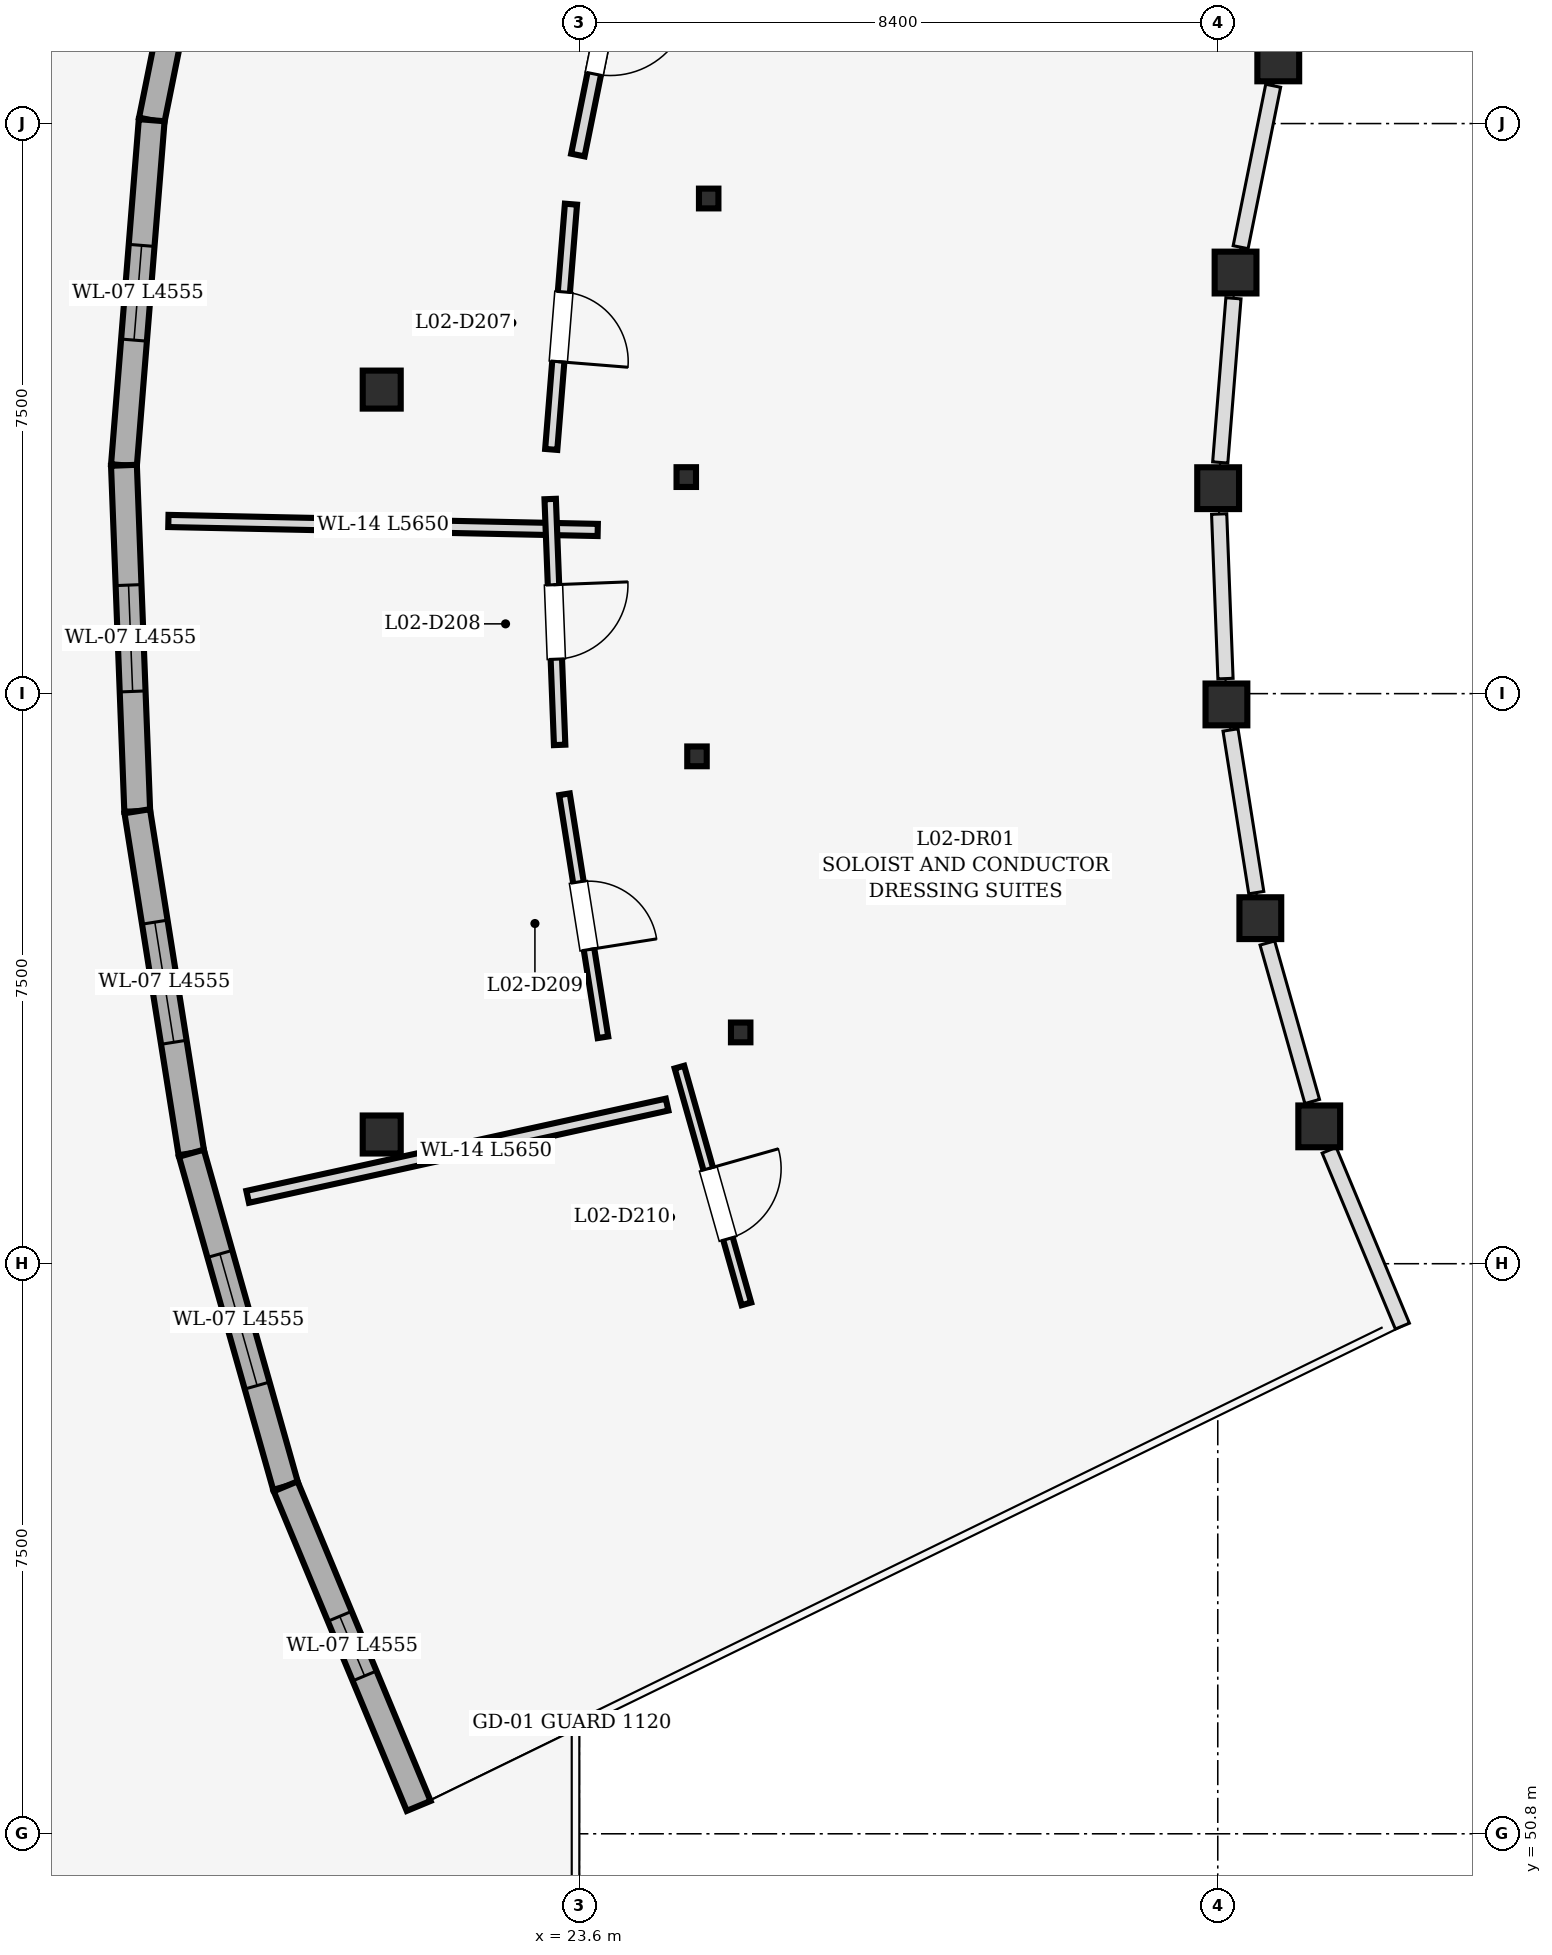
"""IFC4 building model, lengths in metres.
Left out: names, types, materials, properties, quantities, classifications, styles, units other than length and angle.
Written with IfcOpenShell. Run it as: python <this file> out.ifc"""

import sys

from ifc_helpers import new_model, si_unit, direction, frame, frame_2d, origin, origin_2d, place, context, subcontext, project, spatial, rectangle, i_section, extrude, element, fill, save


model = new_model("IFC4")
c1 = context("Model", 3, precision=1e-05, world=origin(), true_north=direction((0.0, 1.0)))
c2 = subcontext(c1, "Body", "Model", "MODEL_VIEW")
j1 = project(units=[si_unit("LENGTHUNIT", "METRE"), si_unit("PLANEANGLEUNIT", "RADIAN")], contexts=[c1])
p1 = place(None, origin())
s1 = spatial("IfcSite", under=j1, at=p1, CompositionType="ELEMENT")
p2 = place(p1, origin())
s2 = spatial("IfcBuilding", under=s1, at=p2, CompositionType="ELEMENT")
p3 = place(p2, frame((0.0, 0.0, 5.4)))
s3 = spatial("IfcBuildingStorey", under=s2, at=p3, CompositionType="ELEMENT", Elevation=5.4)
for number, where, z_axis, x_axis in (
    (1, (32.796, 74.131, 0.0), (0.0, 0.0, 1.0), (1.0, 0.0, 0.0)),
    (2, (32.234, 71.34, 0.0), (0.0, 0.0, 1.0), (1.0, 0.0, 0.0)),
):
    element("IfcColumn", number, at=place(p3, frame(where, z_axis=z_axis, x_axis=x_axis)), inside=s3, PredefinedType="COLUMN", context=c2, shape_type="SweptSolid", body=[
        extrude(rectangle(XDim=0.55, YDim=0.55, at=origin_2d()), origin(), (0.0, 0.0, 1.0), 4.8),
    ])
p4 = place(p3, frame((25.302, 72.314, 0.0), z_axis=(0.0, 0.0, 1.0), x_axis=(1.0, 0.0, 0.0)))
e3 = element("IfcColumn", 3, at=p4, inside=s3, PredefinedType="COLUMN", context=c2, shape_type="SweptSolid", body=[
    extrude(i_section(OverallWidth=0.256, OverallDepth=0.26, WebThickness=0.01, FlangeThickness=0.017, at=origin_2d()), origin(), (0.0, 0.0, 1.0), 4.8),
])
p5 = place(p3, frame((32.005, 68.503, 0.0), z_axis=(0.0, 0.0, 1.0), x_axis=(1.0, 0.0, 0.0)))
e4 = element("IfcColumn", 4, at=p5, inside=s3, PredefinedType="COLUMN", context=c2, shape_type="SweptSolid", body=[
    extrude(rectangle(XDim=0.55, YDim=0.55, at=origin_2d()), origin(), (0.0, 0.0, 1.0), 4.8),
])
p6 = place(p3, frame((25.007, 68.649, 0.0), z_axis=(0.0, 0.0, 1.0), x_axis=(1.0, 0.0, 0.0)))
e5 = element("IfcColumn", 5, at=p6, inside=s3, PredefinedType="COLUMN", context=c2, shape_type="SweptSolid", body=[
    extrude(i_section(OverallWidth=0.256, OverallDepth=0.26, WebThickness=0.01, FlangeThickness=0.017, at=origin_2d()), origin(), (0.0, 0.0, 1.0), 4.8),
])
p7 = place(p3, frame((32.114, 65.658, 0.0), z_axis=(0.0, 0.0, 1.0), x_axis=(1.0, 0.0, 0.0)))
e6 = element("IfcColumn", 6, at=p7, inside=s3, PredefinedType="COLUMN", context=c2, shape_type="SweptSolid", body=[
    extrude(rectangle(XDim=0.55, YDim=0.55, at=origin_2d()), origin(), (0.0, 0.0, 1.0), 4.8),
])
p8 = place(p3, frame((25.148, 64.975, 0.0), z_axis=(0.0, 0.0, 1.0), x_axis=(1.0, 0.0, 0.0)))
e7 = element("IfcColumn", 7, at=p8, inside=s3, PredefinedType="COLUMN", context=c2, shape_type="SweptSolid", body=[
    extrude(i_section(OverallWidth=0.256, OverallDepth=0.26, WebThickness=0.01, FlangeThickness=0.017, at=origin_2d()), origin(), (0.0, 0.0, 1.0), 4.8),
])
p9 = place(p3, frame((32.56, 62.846, 0.0), z_axis=(0.0, 0.0, 1.0), x_axis=(1.0, 0.0, 0.0)))
e8 = element("IfcColumn", 8, at=p9, inside=s3, PredefinedType="COLUMN", context=c2, shape_type="SweptSolid", body=[
    extrude(rectangle(XDim=0.55, YDim=0.55, at=origin_2d()), origin(), (0.0, 0.0, 1.0), 4.8),
])
p10 = place(p3, frame((25.723, 61.343, 0.0), z_axis=(0.0, 0.0, 1.0), x_axis=(1.0, 0.0, 0.0)))
e9 = element("IfcColumn", 9, at=p10, inside=s3, PredefinedType="COLUMN", context=c2, shape_type="SweptSolid", body=[
    extrude(i_section(OverallWidth=0.256, OverallDepth=0.26, WebThickness=0.01, FlangeThickness=0.017, at=origin_2d()), origin(), (0.0, 0.0, 1.0), 4.8),
])
p11 = place(p3, frame((33.335, 60.107, 0.0), z_axis=(0.0, 0.0, 1.0), x_axis=(1.0, 0.0, 0.0)))
e10 = element("IfcColumn", 10, at=p11, inside=s3, PredefinedType="COLUMN", context=c2, shape_type="SweptSolid", body=[
    extrude(rectangle(XDim=0.55, YDim=0.55, at=origin_2d()), origin(), (0.0, 0.0, 1.0), 4.8),
])
for number, where, z_axis, x_axis in (
    (11, (21.0, 60.0, 0.0), (0.0, 0.0, 1.0), (1.0, 0.0, 0.0)),
    (12, (21.0, 69.8, 0.0), (0.0, 0.0, 1.0), (1.0, 0.0, 0.0)),
):
    element("IfcColumn", number, at=place(p3, frame(where, z_axis=z_axis, x_axis=x_axis)), inside=s3, PredefinedType="COLUMN", context=c2, shape_type="SweptSolid", body=[
        extrude(rectangle(XDim=0.5, YDim=0.5, at=origin_2d()), origin(), (0.0, 0.0, 1.0), 4.8),
    ])
p12 = place(p3, frame((18.874, 77.809, 0.0), z_axis=(0.0, 0.0, 1.0), x_axis=(-0.197682700785, -0.980266060726, 0.0)))
e13 = element("IfcWall", 13, at=p12, inside=s3, PredefinedType="STANDARD", context=c2, shape_type="SweptSolid", body=[
    extrude(rectangle(XDim=4.555, YDim=0.34, at=frame_2d((2.277, 0.0))), origin(), (0.0, 0.0, 1.0), 4.505),
])
p13 = place(p12, frame((1.702, 0.0, 0.85)))
e14 = element("IfcOpeningElement", 14, at=p13, cuts=e13, PredefinedType="OPENING", context=c2, shape_type="SweptSolid", body=[
    extrude(rectangle(XDim=1.15, YDim=2.2, at=frame_2d((0.575, 1.1))), frame((0.0, 0.182, 0.0), z_axis=(0.0, -1.0, 0.0), x_axis=(1.0, 0.0, 0.0)), (0.0, 0.0, 1.0), 0.364),
])
p14 = place(p3, frame((17.974, 73.344, 0.0), z_axis=(0.0, 0.0, 1.0), x_axis=(-0.080188345633, -0.996779729541, 0.0)))
e15 = element("IfcWall", 15, at=p14, inside=s3, PredefinedType="STANDARD", context=c2, shape_type="SweptSolid", body=[
    extrude(rectangle(XDim=4.555, YDim=0.34, at=frame_2d((2.277, 0.0))), origin(), (0.0, 0.0, 1.0), 4.505),
])
p15 = place(p14, frame((1.652, 0.0, 0.85)))
e16 = element("IfcOpeningElement", 16, at=p15, cuts=e15, PredefinedType="OPENING", context=c2, shape_type="SweptSolid", body=[
    extrude(rectangle(XDim=1.25, YDim=2.2, at=frame_2d((0.625, 1.1))), frame((0.0, 0.182, 0.0), z_axis=(0.0, -1.0, 0.0), x_axis=(1.0, 0.0, 0.0)), (0.0, 0.0, 1.0), 0.364),
])
p16 = place(p3, frame((17.608, 68.804, 0.0), z_axis=(0.0, 0.0, 1.0), x_axis=(0.038377542804, -0.999263310749, 0.0)))
e17 = element("IfcWall", 17, at=p16, inside=s3, PredefinedType="STANDARD", context=c2, shape_type="SweptSolid", body=[
    extrude(rectangle(XDim=4.555, YDim=0.34, at=frame_2d((2.277, 0.0))), origin(), (0.0, 0.0, 1.0), 4.505),
])
p17 = place(p16, frame((1.577, 0.0, 0.85)))
e18 = element("IfcOpeningElement", 18, at=p17, cuts=e17, PredefinedType="OPENING", context=c2, shape_type="SweptSolid", body=[
    extrude(rectangle(XDim=1.4, YDim=2.2, at=frame_2d((0.7, 1.1))), frame((0.0, 0.182, 0.0), z_axis=(0.0, -1.0, 0.0), x_axis=(1.0, 0.0, 0.0)), (0.0, 0.0, 1.0), 0.364),
])
p18 = place(p3, frame((17.783, 64.253, 0.0), z_axis=(0.0, 0.0, 1.0), x_axis=(0.156466273676, -0.987683302077, 0.0)))
e19 = element("IfcWall", 19, at=p18, inside=s3, PredefinedType="STANDARD", context=c2, shape_type="SweptSolid", body=[
    extrude(rectangle(XDim=4.555, YDim=0.34, at=frame_2d((2.277, 0.0))), origin(), (0.0, 0.0, 1.0), 4.505),
])
p19 = place(p18, frame((1.477, 0.0, 0.85)))
e20 = element("IfcOpeningElement", 20, at=p19, cuts=e19, PredefinedType="OPENING", context=c2, shape_type="SweptSolid", body=[
    extrude(rectangle(XDim=1.6, YDim=2.2, at=frame_2d((0.8, 1.1))), frame((0.0, 0.182, 0.0), z_axis=(0.0, -1.0, 0.0), x_axis=(1.0, 0.0, 0.0)), (0.0, 0.0, 1.0), 0.364),
])
p20 = place(p3, frame((18.496, 59.754, 0.0), z_axis=(0.0, 0.0, 1.0), x_axis=(0.272249427892, -0.962226713936, 0.0)))
e21 = element("IfcWall", 21, at=p20, inside=s3, PredefinedType="STANDARD", context=c2, shape_type="SweptSolid", body=[
    extrude(rectangle(XDim=4.555, YDim=0.34, at=frame_2d((2.277, 0.0))), origin(), (0.0, 0.0, 1.0), 4.505),
])
p21 = place(p20, frame((1.377, 0.0, 0.85)))
e22 = element("IfcOpeningElement", 22, at=p21, cuts=e21, PredefinedType="OPENING", context=c2, shape_type="SweptSolid", body=[
    extrude(rectangle(XDim=1.8, YDim=2.2, at=frame_2d((0.9, 1.1))), frame((0.0, 0.182, 0.0), z_axis=(0.0, -1.0, 0.0), x_axis=(1.0, 0.0, 0.0)), (0.0, 0.0, 1.0), 0.364),
])
p22 = place(p3, frame((19.736, 55.372, 0.0), z_axis=(0.0, 0.0, 1.0), x_axis=(0.384310891198, -0.923203736402, 0.0)))
e23 = element("IfcWall", 23, at=p22, inside=s3, PredefinedType="STANDARD", context=c2, shape_type="SweptSolid", body=[
    extrude(rectangle(XDim=4.555, YDim=0.34, at=frame_2d((2.277, 0.0))), origin(), (0.0, 0.0, 1.0), 3.807),
])
p23 = place(p22, frame((1.852, 0.0, 0.85)))
e24 = element("IfcOpeningElement", 24, at=p23, cuts=e23, PredefinedType="OPENING", context=c2, shape_type="SweptSolid", body=[
    extrude(rectangle(XDim=0.85, YDim=1.95, at=frame_2d((0.425, 0.975))), frame((0.0, 0.182, 0.0), z_axis=(0.0, -1.0, 0.0), x_axis=(1.0, 0.0, 0.0)), (0.0, 0.0, 1.0), 0.364),
])
p24 = place(p3, frame((23.842, 67.953, 0.0), z_axis=(0.0, 0.0, 1.0), x_axis=(-0.999780386636, 0.020956586028, 0.0)))
e25 = element("IfcWall", 25, at=p24, inside=s3, PredefinedType="PARTITIONING", context=c2, shape_type="SweptSolid", body=[
    extrude(rectangle(XDim=5.65, YDim=0.16, at=frame_2d((2.825, 0.0))), origin(), (0.0, 0.0, 1.0), 4.505),
])
p25 = place(p3, frame((24.755, 60.393, 0.0), z_axis=(0.0, 0.0, 1.0), x_axis=(-0.976668579504, -0.214752149721, 0.0)))
e26 = element("IfcWall", 26, at=p25, inside=s3, PredefinedType="PARTITIONING", context=c2, shape_type="SweptSolid", body=[
    extrude(rectangle(XDim=5.65, YDim=0.16, at=frame_2d((2.825, 0.0))), origin(), (0.0, 0.0, 1.0), 3.807),
])
p26 = place(p3, frame((24.22, 76.059, 0.0), z_axis=(0.0, 0.0, 1.0), x_axis=(-0.197609875313, -0.980280744062, 0.0)))
e27 = element("IfcWall", 27, at=p26, inside=s3, PredefinedType="PARTITIONING", context=c2, shape_type="SweptSolid", body=[
    extrude(rectangle(XDim=3.237, YDim=0.18, at=frame_2d((1.618, 0.0))), origin(), (0.0, 0.0, 1.0), 4.505),
])
p27 = place(p26, frame((1.088, 0.0, 0.0)))
e28 = element("IfcOpeningElement", 28, at=p27, cuts=e27, PredefinedType="OPENING", context=c2, shape_type="SweptSolid", body=[
    extrude(rectangle(XDim=1.06, YDim=2.24, at=frame_2d((0.53, 1.12))), frame((0.0, 0.102, 0.0), z_axis=(0.0, -1.0, 0.0), x_axis=(1.0, 0.0, 0.0)), (0.0, 0.0, 1.0), 0.204),
])
p28 = place(p3, frame((23.49, 72.24, 0.0), z_axis=(0.0, 0.0, 1.0), x_axis=(-0.080248823667, -0.996774862394, 0.0)))
e29 = element("IfcWall", 29, at=p28, inside=s3, PredefinedType="PARTITIONING", context=c2, shape_type="SweptSolid", body=[
    extrude(rectangle(XDim=3.237, YDim=0.16, at=frame_2d((1.619, 0.0))), origin(), (0.0, 0.0, 1.0), 4.505),
])
p29 = place(p28, frame((1.158, 0.0, 0.0)))
e30 = element("IfcOpeningElement", 30, at=p29, cuts=e29, PredefinedType="OPENING", context=c2, shape_type="SweptSolid", body=[
    extrude(rectangle(XDim=0.92, YDim=2.1, at=frame_2d((0.46, 1.05))), frame((0.0, 0.092, 0.0), z_axis=(0.0, -1.0, 0.0), x_axis=(1.0, 0.0, 0.0)), (0.0, 0.0, 1.0), 0.184),
])
p30 = place(p3, frame((23.217, 68.36, 0.0), z_axis=(0.0, 0.0, 1.0), x_axis=(0.038386780722, -0.999262955916, 0.0)))
e31 = element("IfcWall", 31, at=p30, inside=s3, PredefinedType="PARTITIONING", context=c2, shape_type="SweptSolid", body=[
    extrude(rectangle(XDim=3.237, YDim=0.15, at=frame_2d((1.619, 0.0))), origin(), (0.0, 0.0, 1.0), 4.505),
])
p31 = place(p30, frame((1.128, 0.0, 0.0)))
e32 = element("IfcOpeningElement", 32, at=p31, cuts=e31, PredefinedType="OPENING", context=c2, shape_type="SweptSolid", body=[
    extrude(rectangle(XDim=0.98, YDim=2.15, at=frame_2d((0.49, 1.075))), frame((0.0, 0.087, 0.0), z_axis=(0.0, -1.0, 0.0), x_axis=(1.0, 0.0, 0.0)), (0.0, 0.0, 1.0), 0.174),
])
p32 = place(p3, frame((23.405, 64.476, 0.0), z_axis=(0.0, 0.0, 1.0), x_axis=(0.156419556763, -0.987690701719, 0.0)))
e33 = element("IfcWall", 33, at=p32, inside=s3, PredefinedType="PARTITIONING", context=c2, shape_type="SweptSolid", body=[
    extrude(rectangle(XDim=3.237, YDim=0.14, at=frame_2d((1.619, 0.0))), origin(), (0.0, 0.0, 1.0), 4.505),
])
p33 = place(p32, frame((1.168, 0.0, 0.0)))
e34 = element("IfcOpeningElement", 34, at=p33, cuts=e33, PredefinedType="OPENING", context=c2, shape_type="SweptSolid", body=[
    extrude(rectangle(XDim=0.9, YDim=2.1, at=frame_2d((0.45, 1.05))), frame((0.0, 0.082, 0.0), z_axis=(0.0, -1.0, 0.0), x_axis=(1.0, 0.0, 0.0)), (0.0, 0.0, 1.0), 0.164),
])
p34 = place(p3, frame((24.917, 60.886, 0.0), z_axis=(0.0, 0.0, 1.0), x_axis=(0.272269765162, -0.96222095954, 0.0)))
e35 = element("IfcWall", 35, at=p34, inside=s3, PredefinedType="PARTITIONING", context=c2, shape_type="SweptSolid", body=[
    extrude(rectangle(XDim=3.237, YDim=0.13, at=frame_2d((1.619, 0.0))), origin(), (0.0, 0.0, 1.0), 4.505),
])
p35 = place(p34, frame((1.388, 0.0, 0.0)))
e36 = element("IfcOpeningElement", 36, at=p35, cuts=e35, PredefinedType="OPENING", context=c2, shape_type="SweptSolid", body=[
    extrude(rectangle(XDim=0.96, YDim=2.18, at=frame_2d((0.48, 1.09))), frame((0.0, 0.077, 0.0), z_axis=(0.0, -1.0, 0.0), x_axis=(1.0, 0.0, 0.0)), (0.0, 0.0, 1.0), 0.154),
])
p36 = place(p15, origin())
e37 = element("IfcWindow", 37, at=p36, inside=s3, PartitioningType="DOUBLE_PANEL_VERTICAL", PredefinedType="WINDOW", context=c2, shape_type="SweptSolid", body=[
    extrude(rectangle(XDim=1.25, YDim=2.2, at=frame_2d((0.625, 1.1))), frame((0.0, 0.03, 0.0), z_axis=(0.0, -1.0, 0.0), x_axis=(1.0, 0.0, 0.0)), (0.0, 0.0, 1.0), 0.06),
])
fill(e16, e37)
p37 = place(p17, origin())
e38 = element("IfcWindow", 38, at=p37, inside=s3, PartitioningType="DOUBLE_PANEL_VERTICAL", PredefinedType="WINDOW", context=c2, shape_type="SweptSolid", body=[
    extrude(rectangle(XDim=1.4, YDim=2.2, at=frame_2d((0.7, 1.1))), frame((0.0, 0.03, 0.0), z_axis=(0.0, -1.0, 0.0), x_axis=(1.0, 0.0, 0.0)), (0.0, 0.0, 1.0), 0.06),
])
fill(e18, e38)
p38 = place(p19, origin())
e39 = element("IfcWindow", 39, at=p38, inside=s3, PartitioningType="DOUBLE_PANEL_VERTICAL", PredefinedType="WINDOW", context=c2, shape_type="SweptSolid", body=[
    extrude(rectangle(XDim=1.6, YDim=2.2, at=frame_2d((0.8, 1.1))), frame((0.0, 0.03, 0.0), z_axis=(0.0, -1.0, 0.0), x_axis=(1.0, 0.0, 0.0)), (0.0, 0.0, 1.0), 0.06),
])
fill(e20, e39)
p39 = place(p21, origin())
e40 = element("IfcWindow", 40, at=p39, inside=s3, PartitioningType="DOUBLE_PANEL_VERTICAL", PredefinedType="WINDOW", context=c2, shape_type="SweptSolid", body=[
    extrude(rectangle(XDim=1.8, YDim=2.2, at=frame_2d((0.9, 1.1))), frame((0.0, 0.03, 0.0), z_axis=(0.0, -1.0, 0.0), x_axis=(1.0, 0.0, 0.0)), (0.0, 0.0, 1.0), 0.06),
])
fill(e22, e40)
p40 = place(p23, origin())
e41 = element("IfcWindow", 41, at=p40, inside=s3, PartitioningType="DOUBLE_PANEL_VERTICAL", PredefinedType="WINDOW", context=c2, shape_type="SweptSolid", body=[
    extrude(rectangle(XDim=0.85, YDim=1.95, at=frame_2d((0.425, 0.975))), frame((0.0, 0.03, 0.0), z_axis=(0.0, -1.0, 0.0), x_axis=(1.0, 0.0, 0.0)), (0.0, 0.0, 1.0), 0.06),
])
fill(e24, e41)
p41 = place(p27, origin())
e42 = element("IfcDoor", 42, at=p41, inside=s3, OperationType="SINGLE_SWING_LEFT", PredefinedType="DOOR", context=c2, shape_type="SweptSolid", body=[
    extrude(rectangle(XDim=1.06, YDim=2.24, at=frame_2d((0.53, 1.12))), frame((0.0, 0.025, 0.0), z_axis=(0.0, -1.0, 0.0), x_axis=(1.0, 0.0, 0.0)), (0.0, 0.0, 1.0), 0.05),
])
fill(e28, e42)
p42 = place(p29, origin())
e43 = element("IfcDoor", 43, at=p42, inside=s3, OperationType="SINGLE_SWING_RIGHT", PredefinedType="DOOR", context=c2, shape_type="SweptSolid", body=[
    extrude(rectangle(XDim=0.92, YDim=2.1, at=frame_2d((0.46, 1.05))), frame((0.0, 0.025, 0.0), z_axis=(0.0, -1.0, 0.0), x_axis=(1.0, 0.0, 0.0)), (0.0, 0.0, 1.0), 0.05),
])
fill(e30, e43)
p43 = place(p31, origin())
e44 = element("IfcDoor", 44, at=p43, inside=s3, OperationType="SINGLE_SWING_LEFT", PredefinedType="DOOR", context=c2, shape_type="SweptSolid", body=[
    extrude(rectangle(XDim=0.98, YDim=2.15, at=frame_2d((0.49, 1.075))), frame((0.0, 0.025, 0.0), z_axis=(0.0, -1.0, 0.0), x_axis=(1.0, 0.0, 0.0)), (0.0, 0.0, 1.0), 0.05),
])
fill(e32, e44)
p44 = place(p33, origin())
e45 = element("IfcDoor", 45, at=p44, inside=s3, OperationType="SINGLE_SWING_RIGHT", PredefinedType="DOOR", context=c2, shape_type="SweptSolid", body=[
    extrude(rectangle(XDim=0.9, YDim=2.1, at=frame_2d((0.45, 1.05))), frame((0.0, 0.025, 0.0), z_axis=(0.0, -1.0, 0.0), x_axis=(1.0, 0.0, 0.0)), (0.0, 0.0, 1.0), 0.05),
])
fill(e34, e45)
p45 = place(p35, origin())
e46 = element("IfcDoor", 46, at=p45, inside=s3, OperationType="SINGLE_SWING_LEFT", PredefinedType="DOOR", context=c2, shape_type="SweptSolid", body=[
    extrude(rectangle(XDim=0.96, YDim=2.18, at=frame_2d((0.48, 1.09))), frame((0.0, 0.025, 0.0), z_axis=(0.0, -1.0, 0.0), x_axis=(1.0, 0.0, 0.0)), (0.0, 0.0, 1.0), 0.05),
])
fill(e36, e46)
save(model, sys.argv[1])
